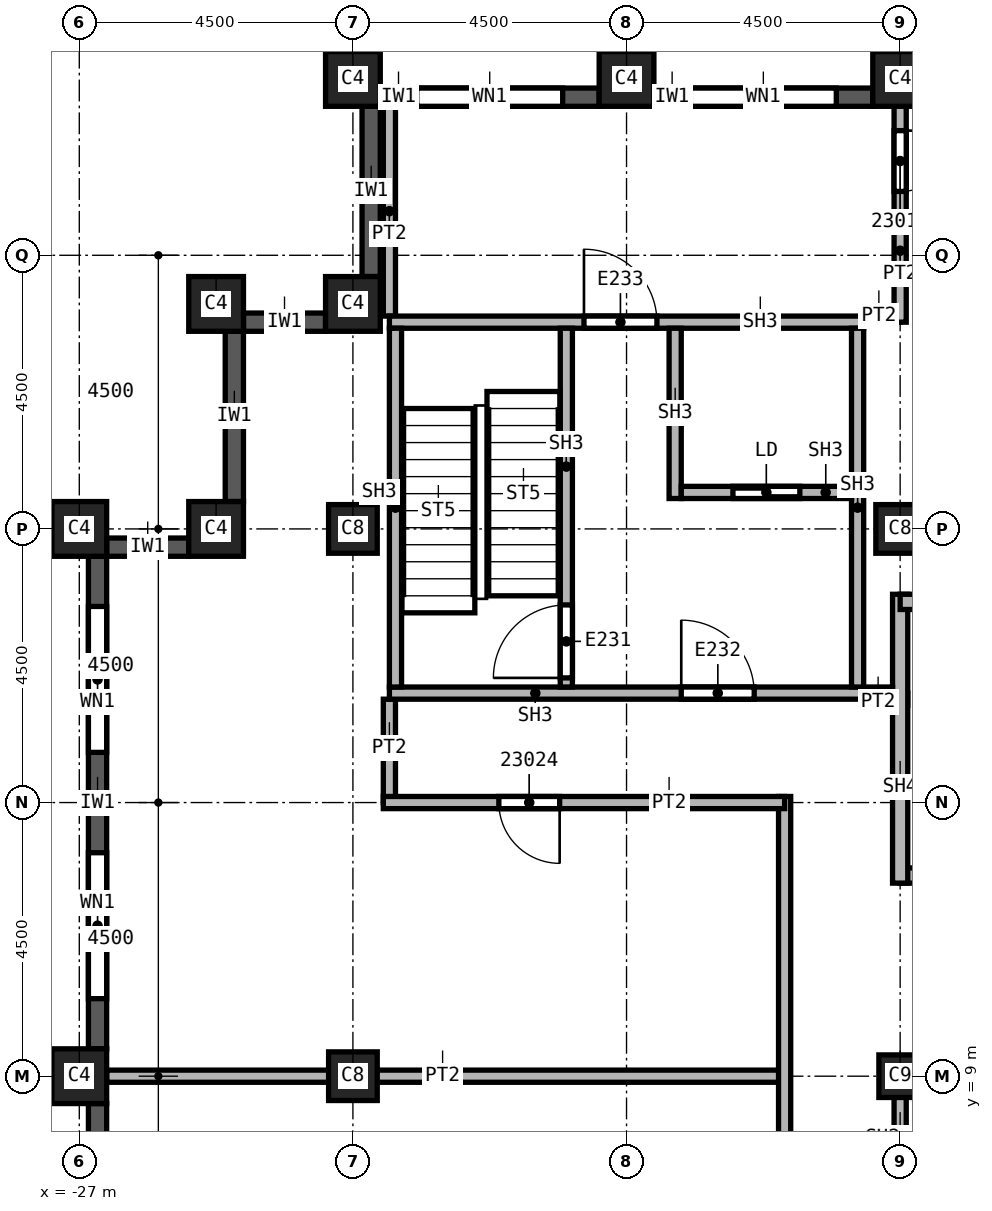
"""IFC4 building model, lengths in metres.
Left out: names, types, materials, properties, quantities, classifications, styles, units other than length and angle.
Written with IfcOpenShell. Run it as: python <this file> out.ifc"""

import sys

from ifc_helpers import new_model, si_unit, direction, frame, frame_2d, origin, origin_2d, place, context, subcontext, project, spatial, rectangle, extrude, element, fill, save


model = new_model("IFC4")
c1 = context("Model", 3, precision=1e-05, world=origin(), true_north=direction((0.0, 1.0)))
c2 = subcontext(c1, "Body", "Model", "MODEL_VIEW")
j1 = project(units=[si_unit("LENGTHUNIT", "METRE"), si_unit("PLANEANGLEUNIT", "RADIAN")], contexts=[c1])
p1 = place(None, origin())
s1 = spatial("IfcSite", under=j1, at=p1, CompositionType="ELEMENT")
p2 = place(p1, origin())
s2 = spatial("IfcBuilding", under=s1, at=p2, CompositionType="ELEMENT")
p3 = place(p2, frame((0.0, 0.0, 330.0)))
s3 = spatial("IfcBuildingStorey", under=s2, at=p3, CompositionType="ELEMENT", Elevation=330.0)
for number, where, z_axis, x_axis in (
    (1, (-13.5, 18.0, 0.0), (0.0, 0.0, 1.0), (1.0, 0.0, 0.0)),
    (2, (-22.5, 9.0, 0.0), (0.0, 0.0, 1.0), (1.0, 0.0, 0.0)),
    (3, (-22.5, 18.0, 0.0), (0.0, 0.0, 1.0), (1.0, 0.0, 0.0)),
):
    element("IfcColumn", number, at=place(p3, frame(where, z_axis=z_axis, x_axis=x_axis)), inside=s3, PredefinedType="COLUMN", context=c2, shape_type="SweptSolid", body=[
        extrude(rectangle(XDim=0.8, YDim=0.8, at=origin_2d()), origin(), (0.0, 0.0, 1.0), 3.74),
    ])
p4 = place(p3, frame((-13.5, 9.0, 0.0), z_axis=(0.0, 0.0, 1.0), x_axis=(1.0, 0.0, 0.0)))
e4 = element("IfcColumn", 4, at=p4, inside=s3, PredefinedType="COLUMN", context=c2, shape_type="SweptSolid", body=[
    extrude(rectangle(XDim=0.7, YDim=0.7, at=origin_2d()), origin(), (0.0, 0.0, 1.0), 3.74),
])
for number, where, z_axis, x_axis in (
    (5, (-13.5, 25.4, 0.0), (0.0, 0.0, 1.0), (1.0, 0.0, 0.0)),
    (6, (-18.0, 25.4, 0.0), (0.0, 0.0, 1.0), (1.0, 0.0, 0.0)),
    (7, (-22.5, 25.4, 0.0), (0.0, 0.0, 1.0), (1.0, 0.0, 0.0)),
    (8, (-27.0, 9.0, 0.0), (0.0, 0.0, 1.0), (0.0, 1.0, 0.0)),
    (9, (-27.0, 18.0, 0.0), (0.0, 0.0, 1.0), (0.0, 1.0, 0.0)),
    (10, (-22.5, 21.7, 0.0), (0.0, 0.0, 1.0), (1.0, 0.0, 0.0)),
    (11, (-24.75, 21.7, 0.0), (0.0, 0.0, 1.0), (1.0, 0.0, 0.0)),
    (12, (-24.75, 18.0, 0.0), (0.0, 0.0, 1.0), (1.0, 0.0, 0.0)),
):
    element("IfcColumn", number, at=place(p3, frame(where, z_axis=z_axis, x_axis=x_axis)), inside=s3, PredefinedType="COLUMN", context=c2, shape_type="SweptSolid", body=[
        extrude(rectangle(XDim=0.9, YDim=0.9, at=origin_2d()), origin(), (0.0, 0.0, 1.0), 3.74),
    ])
p5 = place(p3, frame((-24.45, 21.25, 0.0), z_axis=(0.0, 0.0, 1.0), x_axis=(0.0, -1.0, 0.0)))
e13 = element("IfcWall", 13, at=p5, inside=s3, PredefinedType="SOLIDWALL", context=c2, shape_type="SweptSolid", body=[
    extrude(rectangle(XDim=2.8, YDim=0.3, at=frame_2d((1.4, 0.0))), origin(), (0.0, 0.0, 1.0), 3.14),
])
p6 = place(p3, frame((-25.2, 17.7, 0.0), z_axis=(0.0, 0.0, 1.0), x_axis=(-1.0, 0.0, 0.0)))
e14 = element("IfcWall", 14, at=p6, inside=s3, PredefinedType="SOLIDWALL", context=c2, shape_type="SweptSolid", body=[
    extrude(rectangle(XDim=1.35, YDim=0.3, at=frame_2d((0.675, 0.0))), origin(), (0.0, 0.0, 1.0), 3.14),
])
p7 = place(p3, frame((-26.7, 17.55, 0.0), z_axis=(0.0, 0.0, 1.0), x_axis=(0.0, -1.0, 0.0)))
e15 = element("IfcWall", 15, at=p7, inside=s3, PredefinedType="SOLIDWALL", context=c2, shape_type="SweptSolid", body=[
    extrude(rectangle(XDim=8.1, YDim=0.3, at=frame_2d((4.05, 0.0))), origin(), (0.0, 0.0, 1.0), 3.14),
])
p8 = place(p7, frame((0.825, 0.0, 0.8)))
e16 = element("IfcOpeningElement", 16, at=p8, cuts=e15, PredefinedType="OPENING", context=c2, shape_type="SweptSolid", body=[
    extrude(rectangle(XDim=2.4, YDim=1.95, at=frame_2d((1.2, 0.975))), frame((0.0, 0.15, 0.0), z_axis=(0.0, -1.0, 0.0), x_axis=(1.0, 0.0, 0.0)), (0.0, 0.0, 1.0), 0.3),
])
p9 = place(p7, frame((4.875, 0.0, 0.8)))
e17 = element("IfcOpeningElement", 17, at=p9, cuts=e15, PredefinedType="OPENING", context=c2, shape_type="SweptSolid", body=[
    extrude(rectangle(XDim=2.4, YDim=1.95, at=frame_2d((1.2, 0.975))), frame((0.0, 0.15, 0.0), z_axis=(0.0, -1.0, 0.0), x_axis=(1.0, 0.0, 0.0)), (0.0, 0.0, 1.0), 0.3),
])
p10 = place(p3, frame((-26.7, 8.55, 0.0), z_axis=(0.0, 0.0, 1.0), x_axis=(0.0, -1.0, 0.0)))
e18 = element("IfcWall", 18, at=p10, inside=s3, PredefinedType="SOLIDWALL", context=c2, shape_type="SweptSolid", body=[
    extrude(rectangle(XDim=8.1, YDim=0.3, at=frame_2d((4.05, 0.0))), origin(), (0.0, 0.0, 1.0), 3.14),
])
p11 = place(p10, frame((0.825, 0.0, 0.8)))
e19 = element("IfcOpeningElement", 19, at=p11, cuts=e18, PredefinedType="OPENING", context=c2, shape_type="SweptSolid", body=[
    extrude(rectangle(XDim=2.4, YDim=1.95, at=frame_2d((1.2, 0.975))), frame((0.0, 0.15, 0.0), z_axis=(0.0, -1.0, 0.0), x_axis=(1.0, 0.0, 0.0)), (0.0, 0.0, 1.0), 0.3),
])
p12 = place(p10, frame((4.875, 0.0, 0.8)))
e20 = element("IfcOpeningElement", 20, at=p12, cuts=e18, PredefinedType="OPENING", context=c2, shape_type="SweptSolid", body=[
    extrude(rectangle(XDim=2.4, YDim=1.95, at=frame_2d((1.2, 0.975))), frame((0.0, 0.15, 0.0), z_axis=(0.0, -1.0, 0.0), x_axis=(1.0, 0.0, 0.0)), (0.0, 0.0, 1.0), 0.3),
])
p13 = place(p3, frame((-13.95, 25.1, 0.0), z_axis=(0.0, 0.0, 1.0), x_axis=(-1.0, 0.0, 0.0)))
e21 = element("IfcWall", 21, at=p13, inside=s3, PredefinedType="SOLIDWALL", context=c2, shape_type="SweptSolid", body=[
    extrude(rectangle(XDim=3.6, YDim=0.3, at=frame_2d((1.8, 0.0))), origin(), (0.0, 0.0, 1.0), 3.14),
])
p14 = place(p13, frame((0.6, 0.0, 0.8)))
e22 = element("IfcOpeningElement", 22, at=p14, cuts=e21, PredefinedType="OPENING", context=c2, shape_type="SweptSolid", body=[
    extrude(rectangle(XDim=2.4, YDim=1.95, at=frame_2d((1.2, 0.975))), frame((0.0, 0.15, 0.0), z_axis=(0.0, -1.0, 0.0), x_axis=(1.0, 0.0, 0.0)), (0.0, 0.0, 1.0), 0.3),
])
p15 = place(p3, frame((-18.45, 25.1, 0.0), z_axis=(0.0, 0.0, 1.0), x_axis=(-1.0, 0.0, 0.0)))
e23 = element("IfcWall", 23, at=p15, inside=s3, PredefinedType="SOLIDWALL", context=c2, shape_type="SweptSolid", body=[
    extrude(rectangle(XDim=3.6, YDim=0.3, at=frame_2d((1.8, 0.0))), origin(), (0.0, 0.0, 1.0), 3.14),
])
p16 = place(p15, frame((0.6, 0.0, 0.8)))
e24 = element("IfcOpeningElement", 24, at=p16, cuts=e23, PredefinedType="OPENING", context=c2, shape_type="SweptSolid", body=[
    extrude(rectangle(XDim=2.4, YDim=1.95, at=frame_2d((1.2, 0.975))), frame((0.0, 0.15, 0.0), z_axis=(0.0, -1.0, 0.0), x_axis=(1.0, 0.0, 0.0)), (0.0, 0.0, 1.0), 0.3),
])
p17 = place(p3, frame((-22.2, 24.95, 0.0), z_axis=(0.0, 0.0, 1.0), x_axis=(0.0, -1.0, 0.0)))
e25 = element("IfcWall", 25, at=p17, inside=s3, PredefinedType="SOLIDWALL", context=c2, shape_type="SweptSolid", body=[
    extrude(rectangle(XDim=2.8, YDim=0.3, at=frame_2d((1.4, 0.0))), origin(), (0.0, 0.0, 1.0), 3.14),
])
p18 = place(p3, frame((-22.95, 21.4, 0.0), z_axis=(0.0, 0.0, 1.0), x_axis=(-1.0, 0.0, 0.0)))
e26 = element("IfcWall", 26, at=p18, inside=s3, PredefinedType="SOLIDWALL", context=c2, shape_type="SweptSolid", body=[
    extrude(rectangle(XDim=1.35, YDim=0.3, at=frame_2d((0.675, 0.0))), origin(), (0.0, 0.0, 1.0), 3.14),
])
p19 = place(p3, frame((-26.55, 9.0, 0.0), z_axis=(0.0, 0.0, 1.0), x_axis=(1.0, 0.0, 0.0)))
e27 = element("IfcWall", 27, at=p19, inside=s3, PredefinedType="PARTITIONING", context=c2, shape_type="SweptSolid", body=[
    extrude(rectangle(XDim=11.15, YDim=0.2, at=frame_2d((5.575, 0.0))), origin(), (0.0, 0.0, 1.0), 3.74),
])
p20 = place(p3, frame((-21.9, 13.5, 0.0), z_axis=(0.0, 0.0, 1.0), x_axis=(0.0, 1.0, 0.0)))
e28 = element("IfcWall", 28, at=p20, inside=s3, PredefinedType="PARTITIONING", context=c2, shape_type="SweptSolid", body=[
    extrude(rectangle(XDim=1.7, YDim=0.2, at=frame_2d((0.85, 0.0))), origin(), (0.0, 0.0, 1.0), 3.74),
])
p21 = place(p3, frame((-21.9, 21.5, 0.0), z_axis=(0.0, 0.0, 1.0), x_axis=(0.0, 1.0, 0.0)))
e29 = element("IfcWall", 29, at=p21, inside=s3, PredefinedType="PARTITIONING", context=c2, shape_type="SweptSolid", body=[
    extrude(rectangle(XDim=3.45, YDim=0.2, at=frame_2d((1.725, 0.0))), origin(), (0.0, 0.0, 1.0), 3.74),
])
p22 = place(p3, frame((-15.4, -24.95, 0.0), z_axis=(0.0, 0.0, 1.0), x_axis=(0.0, 1.0, 0.0)))
e30 = element("IfcWall", 30, at=p22, inside=s3, PredefinedType="PARTITIONING", context=c2, shape_type="SweptSolid", body=[
    extrude(rectangle(XDim=38.55, YDim=0.2, at=frame_2d((19.275, 0.0))), origin(), (0.0, 0.0, 1.0), 3.74),
])
p23 = place(p22, frame((30.8, 0.0, 0.0)))
e31 = element("IfcOpeningElement", 31, at=p23, cuts=e30, PredefinedType="OPENING", context=c2, shape_type="SweptSolid", body=[
    extrude(rectangle(XDim=1.0, YDim=2.1, at=frame_2d((0.5, 1.05))), frame((0.0, 0.1, 0.0), z_axis=(0.0, -1.0, 0.0), x_axis=(1.0, 0.0, 0.0)), (0.0, 0.0, 1.0), 0.2),
])
p24 = place(p22, frame((3.1, 0.0, 0.0)))
e32 = element("IfcOpeningElement", 32, at=p24, cuts=e30, PredefinedType="OPENING", context=c2, shape_type="SweptSolid", body=[
    extrude(rectangle(XDim=1.0, YDim=2.1, at=frame_2d((0.5, 1.05))), frame((0.0, 0.1, 0.0), z_axis=(0.0, -1.0, 0.0), x_axis=(1.0, 0.0, 0.0)), (0.0, 0.0, 1.0), 0.2),
])
p25 = place(p22, frame((10.1, 0.0, 0.0)))
e33 = element("IfcOpeningElement", 33, at=p25, cuts=e30, PredefinedType="OPENING", context=c2, shape_type="SweptSolid", body=[
    extrude(rectangle(XDim=1.0, YDim=2.1, at=frame_2d((0.5, 1.05))), frame((0.0, 0.1, 0.0), z_axis=(0.0, -1.0, 0.0), x_axis=(1.0, 0.0, 0.0)), (0.0, 0.0, 1.0), 0.2),
])
p26 = place(p22, frame((18.2, 0.0, 0.0)))
e34 = element("IfcOpeningElement", 34, at=p26, cuts=e30, PredefinedType="OPENING", context=c2, shape_type="SweptSolid", body=[
    extrude(rectangle(XDim=1.0, YDim=2.1, at=frame_2d((0.5, 1.05))), frame((0.0, 0.1, 0.0), z_axis=(0.0, -1.0, 0.0), x_axis=(1.0, 0.0, 0.0)), (0.0, 0.0, 1.0), 0.2),
])
p27 = place(p3, frame((-15.4, 13.5, 0.0), z_axis=(0.0, 0.0, 1.0), x_axis=(-1.0, 0.0, 0.0)))
e35 = element("IfcWall", 35, at=p27, inside=s3, PredefinedType="PARTITIONING", context=c2, shape_type="SweptSolid", body=[
    extrude(rectangle(XDim=6.6, YDim=0.2, at=frame_2d((3.3, 0.0))), origin(), (0.0, 0.0, 1.0), 3.74),
])
p28 = place(p27, frame((3.7, 0.0, 0.0)))
e36 = element("IfcOpeningElement", 36, at=p28, cuts=e35, PredefinedType="OPENING", context=c2, shape_type="SweptSolid", body=[
    extrude(rectangle(XDim=1.0, YDim=2.1, at=frame_2d((0.5, 1.05))), frame((0.0, 0.1, 0.0), z_axis=(0.0, -1.0, 0.0), x_axis=(1.0, 0.0, 0.0)), (0.0, 0.0, 1.0), 0.2),
])
p29 = place(p3, frame((-14.1, 15.2, 0.0), z_axis=(0.0, 0.0, 1.0), x_axis=(1.0, 0.0, 0.0)))
e37 = element("IfcWall", 37, at=p29, inside=s3, PredefinedType="PARTITIONING", context=c2, shape_type="SweptSolid", body=[
    extrude(rectangle(XDim=0.725, YDim=0.2, at=frame_2d((0.363, 0.0))), origin(), (0.0, 0.0, 1.0), 3.74),
])
p30 = place(p3, frame((-13.5, 21.5, 0.0), z_axis=(0.0, 0.0, 1.0), x_axis=(-1.0, 0.0, 0.0)))
e38 = element("IfcWall", 38, at=p30, inside=s3, PredefinedType="PARTITIONING", context=c2, shape_type="SweptSolid", body=[
    extrude(rectangle(XDim=0.6, YDim=0.2, at=frame_2d((0.3, 0.0))), origin(), (0.0, 0.0, 1.0), 3.74),
])
p31 = place(p3, frame((-13.5, 24.95, 0.0), z_axis=(0.0, 0.0, 1.0), x_axis=(0.0, -1.0, 0.0)))
e39 = element("IfcWall", 39, at=p31, inside=s3, PredefinedType="PARTITIONING", context=c2, shape_type="SweptSolid", body=[
    extrude(rectangle(XDim=3.55, YDim=0.2, at=frame_2d((1.775, 0.0))), origin(), (0.0, 0.0, 1.0), 3.74),
])
p32 = place(p31, frame((0.4, 0.0, 0.0)))
e40 = element("IfcOpeningElement", 40, at=p32, cuts=e39, PredefinedType="OPENING", context=c2, shape_type="SweptSolid", body=[
    extrude(rectangle(XDim=1.0, YDim=2.1, at=frame_2d((0.5, 1.05))), frame((0.0, 0.1, 0.0), z_axis=(0.0, -1.0, 0.0), x_axis=(1.0, 0.0, 0.0)), (0.0, 0.0, 1.0), 0.2),
])
p33 = place(p3, frame((-13.5, 7.0, 0.0), z_axis=(0.0, 0.0, 1.0), x_axis=(0.0, 1.0, 0.0)))
e41 = element("IfcWall", 41, at=p33, inside=s3, PredefinedType="SOLIDWALL", context=c2, shape_type="SweptSolid", body=[
    extrude(rectangle(XDim=2.1, YDim=0.2, at=frame_2d((1.05, 0.0))), origin(), (0.0, 0.0, 1.0), 3.062),
])
p34 = place(p3, frame((-13.5, 9.0, 0.0), z_axis=(0.0, 0.0, 1.0), x_axis=(1.0, 0.0, 0.0)))
e42 = element("IfcWall", 42, at=p34, inside=s3, PredefinedType="SOLIDWALL", context=c2, shape_type="SweptSolid", body=[
    extrude(rectangle(XDim=3.0, YDim=0.2, at=frame_2d((1.5, 0.0))), origin(), (0.0, 0.0, 1.0), 3.062),
])
p35 = place(p34, frame((1.0, 0.0, 0.0)))
e43 = element("IfcOpeningElement", 43, at=p35, cuts=e42, PredefinedType="OPENING", context=c2, shape_type="SweptSolid", body=[
    extrude(rectangle(XDim=1.1, YDim=2.1, at=frame_2d((0.55, 1.05))), frame((0.0, 0.1, 0.0), z_axis=(0.0, -1.0, 0.0), x_axis=(1.0, 0.0, 0.0)), (0.0, 0.0, 1.0), 0.2),
])
p36 = place(p3, frame((-13.5, 12.3, 0.0), z_axis=(0.0, 0.0, 1.0), x_axis=(1.0, 0.0, 0.0)))
e44 = element("IfcWall", 44, at=p36, inside=s3, PredefinedType="SOLIDWALL", context=c2, shape_type="SweptSolid", body=[
    extrude(rectangle(XDim=9.125, YDim=0.25, at=frame_2d((4.562, 0.0))), origin(), (0.0, 0.0, 1.0), 3.74),
])
p37 = place(p36, frame((0.6, 0.0, 0.0)))
e45 = element("IfcOpeningElement", 45, at=p37, cuts=e44, PredefinedType="OPENING", context=c2, shape_type="SweptSolid", body=[
    extrude(rectangle(XDim=1.2, YDim=2.1, at=frame_2d((0.6, 1.05))), frame((0.0, 0.125, 0.0), z_axis=(0.0, -1.0, 0.0), x_axis=(1.0, 0.0, 0.0)), (0.0, 0.0, 1.0), 0.25),
])
p38 = place(p3, frame((-13.5, 12.175, 0.0), z_axis=(0.0, 0.0, 1.0), x_axis=(0.0, 1.0, 0.0)))
e46 = element("IfcWall", 46, at=p38, inside=s3, PredefinedType="SOLIDWALL", context=c2, shape_type="SweptSolid", body=[
    extrude(rectangle(XDim=4.75, YDim=0.25, at=frame_2d((2.375, 0.0))), origin(), (0.0, 0.0, 1.0), 3.74),
])
p39 = place(p3, frame((-13.5, 16.8, 0.0), z_axis=(0.0, 0.0, 1.0), x_axis=(1.0, 0.0, 0.0)))
e47 = element("IfcWall", 47, at=p39, inside=s3, PredefinedType="SOLIDWALL", context=c2, shape_type="SweptSolid", body=[
    extrude(rectangle(XDim=9.125, YDim=0.25, at=frame_2d((4.562, 0.0))), origin(), (0.0, 0.0, 1.0), 3.74),
])
p40 = place(p3, frame((-21.9, 15.3, 0.0), z_axis=(0.0, 0.0, 1.0), x_axis=(1.0, 0.0, 0.0)))
e48 = element("IfcWall", 48, at=p40, inside=s3, PredefinedType="SOLIDWALL", context=c2, shape_type="SweptSolid", body=[
    extrude(rectangle(XDim=8.275, YDim=0.2, at=frame_2d((4.137, 0.0))), origin(), (0.0, 0.0, 1.0), 3.74),
])
p41 = place(p40, frame((4.8, 0.0, 0.0)))
e49 = element("IfcOpeningElement", 49, at=p41, cuts=e48, PredefinedType="OPENING", context=c2, shape_type="SweptSolid", body=[
    extrude(rectangle(XDim=1.2, YDim=2.1, at=frame_2d((0.6, 1.05))), frame((0.0, 0.1, 0.0), z_axis=(0.0, -1.0, 0.0), x_axis=(1.0, 0.0, 0.0)), (0.0, 0.0, 1.0), 0.2),
])
p42 = place(p3, frame((-21.9, 21.4, 0.0), z_axis=(0.0, 0.0, 1.0), x_axis=(1.0, 0.0, 0.0)))
e50 = element("IfcWall", 50, at=p42, inside=s3, PredefinedType="SOLIDWALL", context=c2, shape_type="SweptSolid", body=[
    extrude(rectangle(XDim=7.8, YDim=0.2, at=frame_2d((3.9, 0.0))), origin(), (0.0, 0.0, 1.0), 3.74),
])
p43 = place(p42, frame((3.2, 0.0, 0.0)))
e51 = element("IfcOpeningElement", 51, at=p43, cuts=e50, PredefinedType="OPENING", context=c2, shape_type="SweptSolid", body=[
    extrude(rectangle(XDim=1.2, YDim=2.1, at=frame_2d((0.6, 1.05))), frame((0.0, 0.1, 0.0), z_axis=(0.0, -1.0, 0.0), x_axis=(1.0, 0.0, 0.0)), (0.0, 0.0, 1.0), 0.2),
])
for number, where, z_axis, x_axis in (
    (52, (-21.8, 15.4, 0.0), (0.0, 0.0, 1.0), (0.0, 1.0, 0.0)),
    (53, (-14.2, 15.4, 0.0), (0.0, 0.0, 1.0), (0.0, 1.0, 0.0)),
):
    element("IfcWall", number, at=place(p3, frame(where, z_axis=z_axis, x_axis=x_axis)), inside=s3, PredefinedType="SOLIDWALL", context=c2, shape_type="SweptSolid", body=[
        extrude(rectangle(XDim=5.9, YDim=0.2, at=frame_2d((2.95, 0.0))), origin(), (0.0, 0.0, 1.0), 3.74),
    ])
p44 = place(p3, frame((-18.99, 15.4, 0.0), z_axis=(0.0, 0.0, 1.0), x_axis=(0.0, 1.0, 0.0)))
e54 = element("IfcWall", 54, at=p44, inside=s3, PredefinedType="SOLIDWALL", context=c2, shape_type="SweptSolid", body=[
    extrude(rectangle(XDim=5.9, YDim=0.2, at=frame_2d((2.95, 0.0))), origin(), (0.0, 0.0, 1.0), 3.74),
])
p45 = place(p44, frame((0.15, 0.0, 0.0)))
e55 = element("IfcOpeningElement", 55, at=p45, cuts=e54, PredefinedType="OPENING", context=c2, shape_type="SweptSolid", body=[
    extrude(rectangle(XDim=1.2, YDim=2.1, at=frame_2d((0.6, 1.05))), frame((0.0, 0.1, 0.0), z_axis=(0.0, -1.0, 0.0), x_axis=(1.0, 0.0, 0.0)), (0.0, 0.0, 1.0), 0.2),
])
p46 = place(p3, frame((-17.2, 18.5, 0.0), z_axis=(0.0, 0.0, 1.0), x_axis=(0.0, 1.0, 0.0)))
e56 = element("IfcWall", 56, at=p46, inside=s3, PredefinedType="SOLIDWALL", context=c2, shape_type="SweptSolid", body=[
    extrude(rectangle(XDim=2.8, YDim=0.2, at=frame_2d((1.4, 0.0))), origin(), (0.0, 0.0, 1.0), 3.74),
])
p47 = place(p3, frame((-17.1, 18.6, 0.0), z_axis=(0.0, 0.0, 1.0), x_axis=(1.0, 0.0, 0.0)))
e57 = element("IfcWall", 57, at=p47, inside=s3, PredefinedType="SOLIDWALL", context=c2, shape_type="SweptSolid", body=[
    extrude(rectangle(XDim=2.8, YDim=0.2, at=frame_2d((1.4, 0.0))), origin(), (0.0, 0.0, 1.0), 3.74),
])
p48 = place(p47, frame((0.85, 0.0, 0.0)))
e58 = element("IfcOpeningElement", 58, at=p48, cuts=e57, PredefinedType="OPENING", context=c2, shape_type="SweptSolid", body=[
    extrude(rectangle(XDim=1.1, YDim=2.1, at=frame_2d((0.55, 1.05))), frame((0.0, 0.1, 0.0), z_axis=(0.0, -1.0, 0.0), x_axis=(1.0, 0.0, 0.0)), (0.0, 0.0, 1.0), 0.2),
])
p49 = place(p8, origin())
e59 = element("IfcWindow", 59, at=p49, inside=s3, PartitioningType="SINGLE_PANEL", PredefinedType="WINDOW", context=c2, shape_type="SweptSolid", body=[
    extrude(rectangle(XDim=2.4, YDim=1.95, at=frame_2d((1.2, 0.975))), frame((0.0, 0.03, 0.0), z_axis=(0.0, -1.0, 0.0), x_axis=(1.0, 0.0, 0.0)), (0.0, 0.0, 1.0), 0.06),
])
fill(e16, e59)
p50 = place(p9, origin())
e60 = element("IfcWindow", 60, at=p50, inside=s3, PartitioningType="SINGLE_PANEL", PredefinedType="WINDOW", context=c2, shape_type="SweptSolid", body=[
    extrude(rectangle(XDim=2.4, YDim=1.95, at=frame_2d((1.2, 0.975))), frame((0.0, 0.03, 0.0), z_axis=(0.0, -1.0, 0.0), x_axis=(1.0, 0.0, 0.0)), (0.0, 0.0, 1.0), 0.06),
])
fill(e17, e60)
p51 = place(p14, origin())
e61 = element("IfcWindow", 61, at=p51, inside=s3, PartitioningType="SINGLE_PANEL", PredefinedType="WINDOW", context=c2, shape_type="SweptSolid", body=[
    extrude(rectangle(XDim=2.4, YDim=1.95, at=frame_2d((1.2, 0.975))), frame((0.0, 0.03, 0.0), z_axis=(0.0, -1.0, 0.0), x_axis=(1.0, 0.0, 0.0)), (0.0, 0.0, 1.0), 0.06),
])
fill(e22, e61)
p52 = place(p16, origin())
e62 = element("IfcWindow", 62, at=p52, inside=s3, PartitioningType="SINGLE_PANEL", PredefinedType="WINDOW", context=c2, shape_type="SweptSolid", body=[
    extrude(rectangle(XDim=2.4, YDim=1.95, at=frame_2d((1.2, 0.975))), frame((0.0, 0.03, 0.0), z_axis=(0.0, -1.0, 0.0), x_axis=(1.0, 0.0, 0.0)), (0.0, 0.0, 1.0), 0.06),
])
fill(e24, e62)
p53 = place(p32, origin())
e63 = element("IfcDoor", 63, at=p53, inside=s3, OperationType="SINGLE_SWING_RIGHT", PredefinedType="DOOR", context=c2, shape_type="SweptSolid", body=[
    extrude(rectangle(XDim=1.0, YDim=2.1, at=frame_2d((0.5, 1.05))), frame((0.0, 0.025, 0.0), z_axis=(0.0, -1.0, 0.0), x_axis=(1.0, 0.0, 0.0)), (0.0, 0.0, 1.0), 0.05),
])
fill(e40, e63)
p54 = place(p28, origin())
e64 = element("IfcDoor", 64, at=p54, inside=s3, OperationType="SINGLE_SWING_LEFT", PredefinedType="DOOR", context=c2, shape_type="SweptSolid", body=[
    extrude(rectangle(XDim=1.0, YDim=2.1, at=frame_2d((0.5, 1.05))), frame((0.0, 0.025, 0.0), z_axis=(0.0, -1.0, 0.0), x_axis=(1.0, 0.0, 0.0)), (0.0, 0.0, 1.0), 0.05),
])
fill(e36, e64)
p55 = place(p45, origin())
e65 = element("IfcDoor", 65, at=p55, inside=s3, OperationType="SINGLE_SWING_LEFT", PredefinedType="DOOR", context=c2, shape_type="SweptSolid", body=[
    extrude(rectangle(XDim=1.2, YDim=2.1, at=frame_2d((0.6, 1.05))), frame((0.0, 0.025, 0.0), z_axis=(0.0, -1.0, 0.0), x_axis=(1.0, 0.0, 0.0)), (0.0, 0.0, 1.0), 0.05),
])
fill(e55, e65)
p56 = place(p48, origin())
e66 = element("IfcDoor", 66, at=p56, inside=s3, OperationType="SLIDING_TO_LEFT", PredefinedType="DOOR", context=c2, shape_type="SweptSolid", body=[
    extrude(rectangle(XDim=1.1, YDim=2.1, at=frame_2d((0.55, 1.05))), frame((0.0, 0.025, 0.0), z_axis=(0.0, -1.0, 0.0), x_axis=(1.0, 0.0, 0.0)), (0.0, 0.0, 1.0), 0.05),
])
fill(e58, e66)
p57 = place(p41, origin())
e67 = element("IfcDoor", 67, at=p57, inside=s3, OperationType="SINGLE_SWING_RIGHT", PredefinedType="DOOR", context=c2, shape_type="SweptSolid", body=[
    extrude(rectangle(XDim=1.2, YDim=2.1, at=frame_2d((0.6, 1.05))), frame((0.0, 0.025, 0.0), z_axis=(0.0, -1.0, 0.0), x_axis=(1.0, 0.0, 0.0)), (0.0, 0.0, 1.0), 0.05),
])
fill(e49, e67)
p58 = place(p43, origin())
e68 = element("IfcDoor", 68, at=p58, inside=s3, OperationType="SINGLE_SWING_LEFT", PredefinedType="DOOR", context=c2, shape_type="SweptSolid", body=[
    extrude(rectangle(XDim=1.2, YDim=2.1, at=frame_2d((0.6, 1.05))), frame((0.0, 0.025, 0.0), z_axis=(0.0, -1.0, 0.0), x_axis=(1.0, 0.0, 0.0)), (0.0, 0.0, 1.0), 0.05),
])
fill(e51, e68)
save(model, sys.argv[1])
